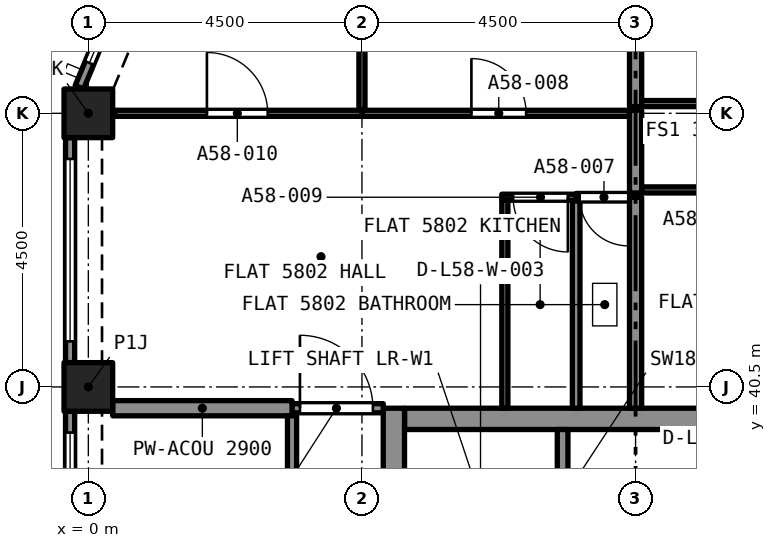
"""IFC4 building model, lengths in metres.
Left out: names, types, materials, properties, quantities, classifications, styles, units other than length and angle.
Written with IfcOpenShell. Run it as: python <this file> out.ifc"""

import sys

from ifc_helpers import new_model, si_unit, direction, frame, frame_2d, origin, origin_2d, place, context, subcontext, project, spatial, rectangle, extrude, element, fill, save


model = new_model("IFC4")
c1 = context("Model", 3, precision=1e-05, world=origin(), true_north=direction((0.0, 1.0)))
c2 = subcontext(c1, "Body", "Model", "MODEL_VIEW")
j1 = project(units=[si_unit("LENGTHUNIT", "METRE"), si_unit("PLANEANGLEUNIT", "RADIAN")], contexts=[c1])
p1 = place(None, origin())
s1 = spatial("IfcSite", under=j1, at=p1, CompositionType="ELEMENT")
p2 = place(p1, origin())
s2 = spatial("IfcBuilding", under=s1, at=p2, CompositionType="ELEMENT")
p3 = place(p2, frame((0.0, 0.0, 210.095)))
s3 = spatial("IfcBuildingStorey", under=s2, at=p3, CompositionType="ELEMENT", Elevation=210.095)
for number, where, z_axis, x_axis in (
    (1, (0.0, 40.5, 0.0), (0.0, 0.0, 1.0), (1.0, 0.0, 0.0)),
    (2, (0.0, 45.0, 0.0), (0.0, 0.0, 1.0), (1.0, 0.0, 0.0)),
):
    element("IfcColumn", number, at=place(p3, frame(where, z_axis=z_axis, x_axis=x_axis)), inside=s3, PredefinedType="COLUMN", context=c2, shape_type="SweptSolid", body=[
        extrude(rectangle(XDim=0.8, YDim=0.8, at=origin_2d()), origin(), (0.0, 0.0, 1.0), 3.2),
    ])
p4 = place(p3, frame((5.2, 39.975, 0.0), z_axis=(0.0, 0.0, 1.0), x_axis=(1.0, 0.0, 0.0)))
e3 = element("IfcWall", 3, at=p4, inside=s3, PredefinedType="SOLIDWALL", context=c2, shape_type="SweptSolid", body=[
    extrude(rectangle(XDim=7.6, YDim=0.35, at=frame_2d((3.8, 0.0))), origin(), (0.0, 0.0, 1.0), 3.2),
])
p5 = place(p3, frame((5.025, 27.35, 0.0), z_axis=(0.0, 0.0, 1.0), x_axis=(0.0, 1.0, 0.0)))
e4 = element("IfcWall", 4, at=p5, inside=s3, PredefinedType="SOLIDWALL", context=c2, shape_type="SweptSolid", body=[
    extrude(rectangle(XDim=12.8, YDim=0.35, at=frame_2d((6.4, 0.0))), origin(), (0.0, 0.0, 1.0), 3.2),
])
p6 = place(p5, frame((8.6, 0.0, 0.0)))
e5 = element("IfcOpeningElement", 5, at=p6, cuts=e4, PredefinedType="OPENING", context=c2, shape_type="SweptSolid", body=[
    extrude(rectangle(XDim=1.2, YDim=2.1, at=frame_2d((0.6, 1.05))), frame((0.0, 0.185, 0.0), z_axis=(0.0, -1.0, 0.0), x_axis=(1.0, 0.0, 0.0)), (0.0, 0.0, 1.0), 0.37),
])
p7 = place(p3, frame((-0.147, 45.429, 0.0), z_axis=(0.0, 0.0, 1.0), x_axis=(0.382669406082, 0.923885342263, 0.0)))
e6 = element("IfcWall", 6, at=p7, inside=s3, PredefinedType="SOLIDWALL", context=c2, shape_type="SweptSolid", body=[
    extrude(rectangle(XDim=2.602, YDim=0.15, at=frame_2d((1.301, 0.0))), origin(), (0.0, 0.0, 1.0), 3.2),
])
p8 = place(p7, frame((0.432, 0.0, 0.45)))
e7 = element("IfcOpeningElement", 7, at=p8, cuts=e6, PredefinedType="OPENING", context=c2, shape_type="SweptSolid", body=[
    extrude(rectangle(XDim=1.9, YDim=1.95, at=frame_2d((0.95, 0.975))), frame((0.0, 0.085, 0.0), z_axis=(0.0, -1.0, 0.0), x_axis=(1.0, 0.0, 0.0)), (0.0, 0.0, 1.0), 0.17),
])
p9 = place(p3, frame((-0.3, 40.9, 0.0), z_axis=(0.0, 0.0, 1.0), x_axis=(0.0, 1.0, 0.0)))
e8 = element("IfcWall", 8, at=p9, inside=s3, PredefinedType="SOLIDWALL", context=c2, shape_type="SweptSolid", body=[
    extrude(rectangle(XDim=3.7, YDim=0.15, at=frame_2d((1.85, 0.0))), origin(), (0.0, 0.0, 1.0), 3.2),
])
p10 = place(p9, frame((0.35, 0.0, 0.45)))
e9 = element("IfcOpeningElement", 9, at=p10, cuts=e8, PredefinedType="OPENING", context=c2, shape_type="SweptSolid", body=[
    extrude(rectangle(XDim=3.0, YDim=1.95, at=frame_2d((1.5, 0.975))), frame((0.0, 0.085, 0.0), z_axis=(0.0, -1.0, 0.0), x_axis=(1.0, 0.0, 0.0)), (0.0, 0.0, 1.0), 0.17),
])
p11 = place(p3, frame((-0.3, 36.4, 0.0), z_axis=(0.0, 0.0, 1.0), x_axis=(0.0, 1.0, 0.0)))
e10 = element("IfcWall", 10, at=p11, inside=s3, PredefinedType="SOLIDWALL", context=c2, shape_type="SweptSolid", body=[
    extrude(rectangle(XDim=3.7, YDim=0.15, at=frame_2d((1.85, 0.0))), origin(), (0.0, 0.0, 1.0), 3.2),
])
p12 = place(p11, frame((0.35, 0.0, 0.45)))
e11 = element("IfcOpeningElement", 11, at=p12, cuts=e10, PredefinedType="OPENING", context=c2, shape_type="SweptSolid", body=[
    extrude(rectangle(XDim=3.0, YDim=1.95, at=frame_2d((1.5, 0.975))), frame((0.0, 0.085, 0.0), z_axis=(0.0, -1.0, 0.0), x_axis=(1.0, 0.0, 0.0)), (0.0, 0.0, 1.0), 0.17),
])
p13 = place(p3, frame((9.0, 43.62, 0.0), z_axis=(0.0, 0.0, 1.0), x_axis=(-1.0, 0.0, 0.0)))
e12 = element("IfcWall", 12, at=p13, inside=s3, PredefinedType="PARTITIONING", context=c2, shape_type="SweptSolid", body=[
    extrude(rectangle(XDim=0.977, YDim=0.125, at=frame_2d((0.489, 0.0))), origin(), (0.0, 0.0, 1.0), 2.9),
])
p14 = place(p13, frame((0.12, 0.0, 0.0)))
e13 = element("IfcOpeningElement", 13, at=p14, cuts=e12, PredefinedType="OPENING", context=c2, shape_type="SweptSolid", body=[
    extrude(rectangle(XDim=0.8, YDim=2.1, at=frame_2d((0.4, 1.05))), frame((0.0, 0.073, 0.0), z_axis=(0.0, -1.0, 0.0), x_axis=(1.0, 0.0, 0.0)), (0.0, 0.0, 1.0), 0.145),
])
p15 = place(p3, frame((8.023, 40.15, 0.0), z_axis=(0.0, 0.0, 1.0), x_axis=(0.0, 1.0, 0.0)))
e14 = element("IfcWall", 14, at=p15, inside=s3, PredefinedType="PARTITIONING", context=c2, shape_type="SweptSolid", body=[
    extrude(rectangle(XDim=3.408, YDim=0.125, at=frame_2d((1.704, 0.0))), origin(), (0.0, 0.0, 1.0), 2.9),
])
p16 = place(p3, frame((9.0, 40.15, 0.0), z_axis=(0.0, 0.0, 1.0), x_axis=(0.0, 1.0, 0.0)))
e15 = element("IfcWall", 15, at=p16, inside=s3, PredefinedType="PARTITIONING", context=c2, shape_type="SweptSolid", body=[
    extrude(rectangle(XDim=3.47, YDim=0.2, at=frame_2d((1.735, 0.0))), origin(), (0.0, 0.0, 1.0), 2.9),
])
p17 = place(p3, frame((4.5, 45.0, 0.0), z_axis=(0.0, 0.0, 1.0), x_axis=(1.0, 0.0, 0.0)))
e16 = element("IfcWall", 16, at=p17, inside=s3, PredefinedType="PARTITIONING", context=c2, shape_type="SweptSolid", body=[
    extrude(rectangle(XDim=4.4, YDim=0.1, at=frame_2d((2.2, 0.0))), origin(), (0.0, 0.0, 1.0), 2.9),
])
p18 = place(p17, frame((1.8, 0.0, 0.0)))
e17 = element("IfcOpeningElement", 17, at=p18, cuts=e16, PredefinedType="OPENING", context=c2, shape_type="SweptSolid", body=[
    extrude(rectangle(XDim=0.9, YDim=2.1, at=frame_2d((0.45, 1.05))), frame((0.0, 0.06, 0.0), z_axis=(0.0, -1.0, 0.0), x_axis=(1.0, 0.0, 0.0)), (0.0, 0.0, 1.0), 0.12),
])
p19 = place(p3, frame((4.5, 45.05, 0.0), z_axis=(0.0, 0.0, 1.0), x_axis=(0.0, 1.0, 0.0)))
e18 = element("IfcWall", 18, at=p19, inside=s3, PredefinedType="PARTITIONING", context=c2, shape_type="SweptSolid", body=[
    extrude(rectangle(XDim=4.017, YDim=0.1, at=frame_2d((2.009, 0.0))), origin(), (0.0, 0.0, 1.0), 2.9),
])
p20 = place(p3, frame((9.0, 45.11, 0.0), z_axis=(0.0, 0.0, 1.0), x_axis=(0.0, 1.0, 0.0)))
e19 = element("IfcWall", 19, at=p20, inside=s3, PredefinedType="PARTITIONING", context=c2, shape_type="SweptSolid", body=[
    extrude(rectangle(XDim=3.99, YDim=0.2, at=frame_2d((1.995, 0.0))), origin(), (0.0, 0.0, 1.0), 2.9),
])
p21 = place(p3, frame((8.023, 43.62, 0.0), z_axis=(0.0, 0.0, 1.0), x_axis=(-1.0, 0.0, 0.0)))
e20 = element("IfcWall", 20, at=p21, inside=s3, PredefinedType="PARTITIONING", context=c2, shape_type="SweptSolid", body=[
    extrude(rectangle(XDim=1.223, YDim=0.1, at=frame_2d((0.611, 0.0))), origin(), (0.0, 0.0, 1.0), 2.9),
])
p22 = place(p21, frame((0.136, 0.0, 0.0)))
e21 = element("IfcOpeningElement", 21, at=p22, cuts=e20, PredefinedType="OPENING", context=c2, shape_type="SweptSolid", body=[
    extrude(rectangle(XDim=0.9, YDim=2.1, at=frame_2d((0.45, 1.05))), frame((0.0, 0.06, 0.0), z_axis=(0.0, -1.0, 0.0), x_axis=(1.0, 0.0, 0.0)), (0.0, 0.0, 1.0), 0.12),
])
p23 = place(p3, frame((6.85, 40.15, 0.0), z_axis=(0.0, 0.0, 1.0), x_axis=(0.0, 1.0, 0.0)))
e22 = element("IfcWall", 22, at=p23, inside=s3, PredefinedType="PARTITIONING", context=c2, shape_type="SweptSolid", body=[
    extrude(rectangle(XDim=3.42, YDim=0.1, at=frame_2d((1.71, 0.0))), origin(), (0.0, 0.0, 1.0), 2.9),
])
p24 = place(p3, frame((0.433, 45.0, 0.0), z_axis=(0.0, 0.0, 1.0), x_axis=(1.0, 0.0, 0.0)))
e23 = element("IfcWall", 23, at=p24, inside=s3, PredefinedType="PARTITIONING", context=c2, shape_type="SweptSolid", body=[
    extrude(rectangle(XDim=4.067, YDim=0.1, at=frame_2d((2.034, 0.0))), origin(), (0.0, 0.0, 1.0), 2.9),
])
p25 = place(p24, frame((1.517, 0.0, 0.0)))
e24 = element("IfcOpeningElement", 24, at=p25, cuts=e23, PredefinedType="OPENING", context=c2, shape_type="SweptSolid", body=[
    extrude(rectangle(XDim=1.0, YDim=2.1, at=frame_2d((0.5, 1.05))), frame((0.0, 0.06, 0.0), z_axis=(0.0, -1.0, 0.0), x_axis=(1.0, 0.0, 0.0)), (0.0, 0.0, 1.0), 0.12),
])
p26 = place(p3, frame((9.0, 43.69, 0.0), z_axis=(0.0, 0.0, 1.0), x_axis=(0.0, 1.0, 0.0)))
e25 = element("IfcWall", 25, at=p26, inside=s3, PredefinedType="PARTITIONING", context=c2, shape_type="SweptSolid", body=[
    extrude(rectangle(XDim=1.36, YDim=0.2, at=frame_2d((0.68, 0.0))), origin(), (0.0, 0.0, 1.0), 2.9),
])
p27 = place(p3, frame((3.35, 40.15, 0.0), z_axis=(0.0, 0.0, 1.0), x_axis=(1.0, 0.0, 0.0)))
e26 = element("IfcWall", 26, at=p27, inside=s3, PredefinedType="PARTITIONING", context=c2, shape_type="SweptSolid", body=[
    extrude(rectangle(XDim=1.5, YDim=0.15, at=frame_2d((0.75, 0.0))), origin(), (0.0, 0.0, 1.0), 2.9),
])
p28 = place(p27, frame((0.13, 0.0, 0.0)))
e27 = element("IfcOpeningElement", 27, at=p28, cuts=e26, PredefinedType="OPENING", context=c2, shape_type="SweptSolid", body=[
    extrude(rectangle(XDim=1.2, YDim=2.4, at=frame_2d((0.6, 1.2))), frame((0.0, 0.085, 0.0), z_axis=(0.0, -1.0, 0.0), x_axis=(1.0, 0.0, 0.0)), (0.0, 0.0, 1.0), 0.17),
])
p29 = place(p3, frame((0.4, 40.15, 0.0), z_axis=(0.0, 0.0, 1.0), x_axis=(1.0, 0.0, 0.0)))
e28 = element("IfcWall", 28, at=p29, inside=s3, PredefinedType="PARTITIONING", context=c2, shape_type="SweptSolid", body=[
    extrude(rectangle(XDim=2.95, YDim=0.25, at=frame_2d((1.475, 0.0))), origin(), (0.0, 0.0, 1.0), 2.9),
])
p30 = place(p3, frame((12.201, 43.74, 0.0), z_axis=(0.0, 0.0, 1.0), x_axis=(-1.0, 0.0, 0.0)))
e29 = element("IfcWall", 29, at=p30, inside=s3, PredefinedType="PARTITIONING", context=c2, shape_type="SweptSolid", body=[
    extrude(rectangle(XDim=3.101, YDim=0.1, at=frame_2d((1.55, 0.0))), origin(), (0.0, 0.0, 1.0), 2.9),
])
p31 = place(p30, frame((1.15, 0.0, 0.0)))
e30 = element("IfcOpeningElement", 30, at=p31, cuts=e29, PredefinedType="OPENING", context=c2, shape_type="SweptSolid", body=[
    extrude(rectangle(XDim=0.9, YDim=2.1, at=frame_2d((0.45, 1.05))), frame((0.0, 0.06, 0.0), z_axis=(0.0, -1.0, 0.0), x_axis=(1.0, 0.0, 0.0)), (0.0, 0.0, 1.0), 0.12),
])
p32 = place(p3, frame((9.1, 45.16, 0.0), z_axis=(0.0, 0.0, 1.0), x_axis=(1.0, 0.0, 0.0)))
e31 = element("IfcWall", 31, at=p32, inside=s3, PredefinedType="PARTITIONING", context=c2, shape_type="SweptSolid", body=[
    extrude(rectangle(XDim=4.4, YDim=0.1, at=frame_2d((2.2, 0.0))), origin(), (0.0, 0.0, 1.0), 2.9),
])
p33 = place(p32, frame((1.65, 0.0, 0.0)))
e32 = element("IfcOpeningElement", 32, at=p33, cuts=e31, PredefinedType="OPENING", context=c2, shape_type="SweptSolid", body=[
    extrude(rectangle(XDim=1.0, YDim=2.1, at=frame_2d((0.5, 1.05))), frame((0.0, 0.06, 0.0), z_axis=(0.0, -1.0, 0.0), x_axis=(1.0, 0.0, 0.0)), (0.0, 0.0, 1.0), 0.12),
])
p34 = place(p3, frame((3.35, 31.5, 0.0), z_axis=(0.0, 0.0, 1.0), x_axis=(0.0, 1.0, 0.0)))
e33 = element("IfcWall", 33, at=p34, inside=s3, PredefinedType="PARTITIONING", context=c2, shape_type="SweptSolid", body=[
    extrude(rectangle(XDim=8.525, YDim=0.15, at=frame_2d((4.262, 0.0))), origin(), (0.0, 0.0, 1.0), 2.9),
])
p35 = place(p34, frame((3.825, 0.0, 0.0)))
e34 = element("IfcOpeningElement", 34, at=p35, cuts=e33, PredefinedType="OPENING", context=c2, shape_type="SweptSolid", body=[
    extrude(rectangle(XDim=1.0, YDim=2.1, at=frame_2d((0.5, 1.05))), frame((0.0, 0.085, 0.0), z_axis=(0.0, -1.0, 0.0), x_axis=(1.0, 0.0, 0.0)), (0.0, 0.0, 1.0), 0.17),
])
p36 = place(p3, frame((7.8, 37.5, 0.0), z_axis=(0.0, 0.0, 1.0), x_axis=(0.0, 1.0, 0.0)))
e35 = element("IfcWall", 35, at=p36, inside=s3, PredefinedType="SOLIDWALL", context=c2, shape_type="SweptSolid", body=[
    extrude(rectangle(XDim=2.3, YDim=0.175, at=frame_2d((1.15, 0.0))), origin(), (0.0, 0.0, 1.0), 2.9),
])
p37 = place(p8, origin())
e36 = element("IfcWindow", 36, at=p37, inside=s3, PartitioningType="SINGLE_PANEL", PredefinedType="WINDOW", context=c2, shape_type="SweptSolid", body=[
    extrude(rectangle(XDim=1.9, YDim=1.95, at=frame_2d((0.95, 0.975))), frame((0.0, 0.03, 0.0), z_axis=(0.0, -1.0, 0.0), x_axis=(1.0, 0.0, 0.0)), (0.0, 0.0, 1.0), 0.06),
])
fill(e7, e36)
p38 = place(p10, origin())
e37 = element("IfcWindow", 37, at=p38, inside=s3, PartitioningType="SINGLE_PANEL", PredefinedType="WINDOW", context=c2, shape_type="SweptSolid", body=[
    extrude(rectangle(XDim=3.0, YDim=1.95, at=frame_2d((1.5, 0.975))), frame((0.0, 0.03, 0.0), z_axis=(0.0, -1.0, 0.0), x_axis=(1.0, 0.0, 0.0)), (0.0, 0.0, 1.0), 0.06),
])
fill(e9, e37)
p39 = place(p12, origin())
e38 = element("IfcWindow", 38, at=p39, inside=s3, PartitioningType="SINGLE_PANEL", PredefinedType="WINDOW", context=c2, shape_type="SweptSolid", body=[
    extrude(rectangle(XDim=3.0, YDim=1.95, at=frame_2d((1.5, 0.975))), frame((0.0, 0.03, 0.0), z_axis=(0.0, -1.0, 0.0), x_axis=(1.0, 0.0, 0.0)), (0.0, 0.0, 1.0), 0.06),
])
fill(e11, e38)
p40 = place(p14, origin())
e39 = element("IfcDoor", 39, at=p40, inside=s3, OperationType="SINGLE_SWING_LEFT", PredefinedType="DOOR", context=c2, shape_type="SweptSolid", body=[
    extrude(rectangle(XDim=0.8, YDim=2.1, at=frame_2d((0.4, 1.05))), frame((0.0, 0.025, 0.0), z_axis=(0.0, -1.0, 0.0), x_axis=(1.0, 0.0, 0.0)), (0.0, 0.0, 1.0), 0.05),
])
fill(e13, e39)
p41 = place(p18, origin())
e40 = element("IfcDoor", 40, at=p41, inside=s3, OperationType="SINGLE_SWING_RIGHT", PredefinedType="DOOR", context=c2, shape_type="SweptSolid", body=[
    extrude(rectangle(XDim=0.9, YDim=2.1, at=frame_2d((0.45, 1.05))), frame((0.0, 0.025, 0.0), z_axis=(0.0, -1.0, 0.0), x_axis=(1.0, 0.0, 0.0)), (0.0, 0.0, 1.0), 0.05),
])
fill(e17, e40)
p42 = place(p22, origin())
e41 = element("IfcDoor", 41, at=p42, inside=s3, OperationType="SINGLE_SWING_LEFT", PredefinedType="DOOR", context=c2, shape_type="SweptSolid", body=[
    extrude(rectangle(XDim=0.9, YDim=2.1, at=frame_2d((0.45, 1.05))), frame((0.0, 0.025, 0.0), z_axis=(0.0, -1.0, 0.0), x_axis=(1.0, 0.0, 0.0)), (0.0, 0.0, 1.0), 0.05),
])
fill(e21, e41)
p43 = place(p25, origin())
e42 = element("IfcDoor", 42, at=p43, inside=s3, OperationType="SINGLE_SWING_LEFT", PredefinedType="DOOR", context=c2, shape_type="SweptSolid", body=[
    extrude(rectangle(XDim=1.0, YDim=2.1, at=frame_2d((0.5, 1.05))), frame((0.0, 0.025, 0.0), z_axis=(0.0, -1.0, 0.0), x_axis=(1.0, 0.0, 0.0)), (0.0, 0.0, 1.0), 0.05),
])
fill(e24, e42)
p44 = place(p28, origin())
e43 = element("IfcDoor", 43, at=p44, inside=s3, OperationType="SINGLE_SWING_LEFT", PredefinedType="DOOR", context=c2, shape_type="SweptSolid", body=[
    extrude(rectangle(XDim=1.2, YDim=2.4, at=frame_2d((0.6, 1.2))), frame((0.0, 0.025, 0.0), z_axis=(0.0, -1.0, 0.0), x_axis=(1.0, 0.0, 0.0)), (0.0, 0.0, 1.0), 0.05),
])
fill(e27, e43)
save(model, sys.argv[1])
